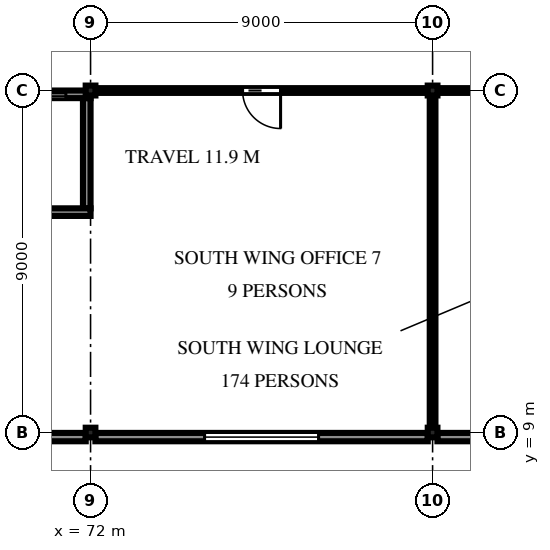
"""IFC4 building model, lengths in metres.
Left out: names, types, materials, properties, quantities, classifications, styles, units other than length and angle.
Written with IfcOpenShell. Run it as: python <this file> out.ifc"""

import sys

from ifc_helpers import new_model, si_unit, direction, frame, frame_2d, origin, origin_2d, place, context, subcontext, project, spatial, polyline, rectangle, i_section, outline, extrude, element, fill, save


model = new_model("IFC4")
c1 = context("Model", 3, precision=1e-05, world=origin(), true_north=direction((0.0, 1.0)))
c2 = subcontext(c1, "Body", "Model", "MODEL_VIEW")
j1 = project(units=[si_unit("LENGTHUNIT", "METRE"), si_unit("PLANEANGLEUNIT", "RADIAN")], contexts=[c1])
p1 = place(None, origin())
s1 = spatial("IfcSite", under=j1, at=p1, CompositionType="ELEMENT")
p2 = place(p1, origin())
s2 = spatial("IfcBuilding", under=s1, at=p2, CompositionType="ELEMENT")
p3 = place(p2, frame((0.0, 0.0, 7.5)))
s3 = spatial("IfcBuildingStorey", under=s2, at=p3, CompositionType="ELEMENT", Elevation=7.5)
p4 = place(p3, frame((72.0, 9.0, 0.0), z_axis=(0.0, 0.0, 1.0), x_axis=(1.0, 0.0, 0.0)))
e1 = element("IfcColumn", 1, at=p4, inside=s3, PredefinedType="COLUMN", context=c2, shape_type="SweptSolid", body=[
    extrude(i_section(OverallWidth=0.255, OverallDepth=0.254, WebThickness=0.009, FlangeThickness=0.014, FilletRadius=0.013, at=origin_2d()), origin(), (0.0, 0.0, 1.0), 4.2),
])
p5 = place(p3, frame((72.0, 18.0, 0.0), z_axis=(0.0, 0.0, 1.0), x_axis=(1.0, 0.0, 0.0)))
e2 = element("IfcColumn", 2, at=p5, inside=s3, PredefinedType="COLUMN", context=c2, shape_type="SweptSolid", body=[
    extrude(i_section(OverallWidth=0.256, OverallDepth=0.26, WebThickness=0.01, FlangeThickness=0.017, FilletRadius=0.013, at=origin_2d()), origin(), (0.0, 0.0, 1.0), 4.2),
])
p6 = place(p3, frame((81.0, 9.0, 0.0), z_axis=(0.0, 0.0, 1.0), x_axis=(1.0, 0.0, 0.0)))
e3 = element("IfcColumn", 3, at=p6, inside=s3, PredefinedType="COLUMN", context=c2, shape_type="SweptSolid", body=[
    extrude(i_section(OverallWidth=0.255, OverallDepth=0.254, WebThickness=0.009, FlangeThickness=0.014, FilletRadius=0.013, at=origin_2d()), origin(), (0.0, 0.0, 1.0), 4.2),
])
p7 = place(p3, frame((81.0, 18.0, 0.0), z_axis=(0.0, 0.0, 1.0), x_axis=(1.0, 0.0, 0.0)))
e4 = element("IfcColumn", 4, at=p7, inside=s3, PredefinedType="COLUMN", context=c2, shape_type="SweptSolid", body=[
    extrude(i_section(OverallWidth=0.256, OverallDepth=0.26, WebThickness=0.01, FlangeThickness=0.017, FilletRadius=0.013, at=origin_2d()), origin(), (0.0, 0.0, 1.0), 4.2),
])
p8 = place(p3, frame((63.127, 8.88, -0.13), z_axis=(0.0, 0.0, 1.0), x_axis=(1.0, 0.0, 0.0)))
e5 = element("IfcWall", 5, at=p8, inside=s3, PredefinedType="SOLIDWALL", context=c2, shape_type="SweptSolid", body=[
    extrude(rectangle(XDim=8.746, YDim=0.22, at=frame_2d((4.373, 0.0))), origin(), (0.0, 0.0, 1.0), 3.727),
])
p9 = place(p8, frame((2.873, 0.0, 1.03)))
e6 = element("IfcOpeningElement", 6, at=p9, cuts=e5, PredefinedType="OPENING", context=c2, shape_type="SweptSolid", body=[
    extrude(rectangle(XDim=3.0, YDim=2.1, at=frame_2d((1.5, 1.05))), frame((0.0, 0.12, 0.0), z_axis=(0.0, -1.0, 0.0), x_axis=(1.0, 0.0, 0.0)), (0.0, 0.0, 1.0), 0.24),
])
p10 = place(p3, frame((72.127, 8.88, -0.13), z_axis=(0.0, 0.0, 1.0), x_axis=(1.0, 0.0, 0.0)))
e7 = element("IfcWall", 7, at=p10, inside=s3, PredefinedType="SOLIDWALL", context=c2, shape_type="SweptSolid", body=[
    extrude(rectangle(XDim=8.746, YDim=0.22, at=frame_2d((4.373, 0.0))), origin(), (0.0, 0.0, 1.0), 3.727),
])
p11 = place(p10, frame((2.873, 0.0, 1.03)))
e8 = element("IfcOpeningElement", 8, at=p11, cuts=e7, PredefinedType="OPENING", context=c2, shape_type="SweptSolid", body=[
    extrude(rectangle(XDim=3.0, YDim=2.1, at=frame_2d((1.5, 1.05))), frame((0.0, 0.12, 0.0), z_axis=(0.0, -1.0, 0.0), x_axis=(1.0, 0.0, 0.0)), (0.0, 0.0, 1.0), 0.24),
])
p12 = place(p3, frame((81.127, 8.88, -0.13), z_axis=(0.0, 0.0, 1.0), x_axis=(1.0, 0.0, 0.0)))
e9 = element("IfcWall", 9, at=p12, inside=s3, PredefinedType="SOLIDWALL", context=c2, shape_type="SweptSolid", body=[
    extrude(rectangle(XDim=8.746, YDim=0.22, at=frame_2d((4.373, 0.0))), origin(), (0.0, 0.0, 1.0), 3.727),
])
p13 = place(p12, frame((2.873, 0.0, 1.03)))
e10 = element("IfcOpeningElement", 10, at=p13, cuts=e9, PredefinedType="OPENING", context=c2, shape_type="SweptSolid", body=[
    extrude(rectangle(XDim=3.0, YDim=2.1, at=frame_2d((1.5, 1.05))), frame((0.0, 0.12, 0.0), z_axis=(0.0, -1.0, 0.0), x_axis=(1.0, 0.0, 0.0)), (0.0, 0.0, 1.0), 0.24),
])
p14 = place(p3, frame((69.602, 14.8, 0.0), z_axis=(0.0, 0.0, 1.0), x_axis=(1.0, 0.0, 0.0)))
e11 = element("IfcWall", 11, at=p14, inside=s3, PredefinedType="SOLIDWALL", context=c2, shape_type="SweptSolid", body=[
    extrude(rectangle(XDim=2.398, YDim=0.2, at=frame_2d((1.199, 0.0))), origin(), (0.0, 0.0, 1.0), 3.516),
])
p15 = place(p3, frame((69.602, 17.9, 0.0), z_axis=(0.0, 0.0, 1.0), x_axis=(1.0, 0.0, 0.0)))
e12 = element("IfcWall", 12, at=p15, inside=s3, PredefinedType="SOLIDWALL", context=c2, shape_type="SweptSolid", body=[
    extrude(rectangle(XDim=2.398, YDim=0.2, at=frame_2d((1.199, 0.0))), origin(), (0.0, 0.0, 1.0), 3.516),
])
p16 = place(p15, frame((0.648, 0.0, 0.0)))
e13 = element("IfcOpeningElement", 13, at=p16, cuts=e12, PredefinedType="OPENING", context=c2, shape_type="SweptSolid", body=[
    extrude(rectangle(XDim=1.1, YDim=2.1, at=frame_2d((0.55, 1.05))), frame((0.0, 0.11, 0.0), z_axis=(0.0, -1.0, 0.0), x_axis=(1.0, 0.0, 0.0)), (0.0, 0.0, 1.0), 0.22),
])
p17 = place(p3, frame((71.9, 14.9, 0.0), z_axis=(0.0, 0.0, 1.0), x_axis=(0.0, 1.0, 0.0)))
e14 = element("IfcWall", 14, at=p17, inside=s3, PredefinedType="SOLIDWALL", context=c2, shape_type="SweptSolid", body=[
    extrude(rectangle(XDim=2.9, YDim=0.2, at=frame_2d((1.45, 0.0))), origin(), (0.0, 0.0, 1.0), 3.516),
])
p18 = place(p3, frame((89.872, 18.0, 0.0), z_axis=(0.0, 0.0, 1.0), x_axis=(-1.0, 0.0, 0.0)))
e15 = element("IfcWall", 15, at=p18, inside=s3, PredefinedType="PARTITIONING", context=c2, shape_type="SweptSolid", body=[
    extrude(rectangle(XDim=8.744, YDim=0.125, at=frame_2d((4.372, 0.0))), origin(), (0.0, 0.0, 1.0), 3.307),
])
p19 = place(p18, frame((3.472, 0.0, 0.0)))
e16 = element("IfcOpeningElement", 16, at=p19, cuts=e15, PredefinedType="OPENING", context=c2, shape_type="SweptSolid", body=[
    extrude(rectangle(XDim=1.8, YDim=2.4, at=frame_2d((0.9, 1.2))), frame((0.0, 0.073, 0.0), z_axis=(0.0, -1.0, 0.0), x_axis=(1.0, 0.0, 0.0)), (0.0, 0.0, 1.0), 0.145),
])
p20 = place(p3, frame((80.872, 18.0, 0.0), z_axis=(0.0, 0.0, 1.0), x_axis=(-1.0, 0.0, 0.0)))
e17 = element("IfcWall", 17, at=p20, inside=s3, PredefinedType="PARTITIONING", context=c2, shape_type="SweptSolid", body=[
    extrude(rectangle(XDim=8.744, YDim=0.125, at=frame_2d((4.372, 0.0))), origin(), (0.0, 0.0, 1.0), 3.307),
])
p21 = place(p20, frame((3.872, 0.0, 0.0)))
e18 = element("IfcOpeningElement", 18, at=p21, cuts=e17, PredefinedType="OPENING", context=c2, shape_type="SweptSolid", body=[
    extrude(rectangle(XDim=1.0, YDim=2.1, at=frame_2d((0.5, 1.05))), frame((0.0, 0.073, 0.0), z_axis=(0.0, -1.0, 0.0), x_axis=(1.0, 0.0, 0.0)), (0.0, 0.0, 1.0), 0.145),
])
p22 = place(p3, frame((81.0, 9.127, 0.0), z_axis=(0.0, 0.0, 1.0), x_axis=(0.0, 1.0, 0.0)))
e19 = element("IfcWall", 19, at=p22, inside=s3, PredefinedType="PARTITIONING", context=c2, shape_type="SweptSolid", body=[
    extrude(rectangle(XDim=8.743, YDim=0.15, at=frame_2d((4.372, 0.0))), origin(), (0.0, 0.0, 1.0), 3.307),
])
p23 = place(p11, origin())
e20 = element("IfcWindow", 20, at=p23, inside=s3, PartitioningType="TRIPLE_PANEL_VERTICAL", PredefinedType="WINDOW", context=c2, shape_type="SweptSolid", body=[
    extrude(outline(polyline([(0.0, 0.0), (3.0, 0.0), (3.0, 2.1), (0.0, 2.1), (0.0, 0.0)]), holes=[polyline([(0.07, 0.07), (2.93, 0.07), (2.93, 2.03), (0.07, 2.03), (0.07, 0.07)])]), frame((0.0, 0.03, 0.0), z_axis=(0.0, -1.0, 0.0), x_axis=(1.0, 0.0, 0.0)), (0.0, 0.0, 1.0), 0.06),
    extrude(rectangle(XDim=0.04, YDim=1.96, at=frame_2d((1.017, 1.05))), frame((0.0, 0.022, 0.0), z_axis=(0.0, -1.0, 0.0), x_axis=(1.0, 0.0, 0.0)), (0.0, 0.0, 1.0), 0.044),
    extrude(rectangle(XDim=0.04, YDim=1.96, at=frame_2d((1.983, 1.05))), frame((0.0, 0.022, 0.0), z_axis=(0.0, -1.0, 0.0), x_axis=(1.0, 0.0, 0.0)), (0.0, 0.0, 1.0), 0.044),
    extrude(outline(polyline([(0.07, 0.07), (0.997, 0.07), (0.997, 2.03), (0.07, 2.03), (0.07, 0.07)]), holes=[polyline([(0.1, 0.1), (0.967, 0.1), (0.967, 2.0), (0.1, 2.0), (0.1, 0.1)])]), frame((0.0, 0.022, 0.0), z_axis=(0.0, -1.0, 0.0), x_axis=(1.0, 0.0, 0.0)), (0.0, 0.0, 1.0), 0.045),
    extrude(rectangle(XDim=0.866, YDim=1.9, at=frame_2d((0.533, 1.05))), frame((0.0, 0.006, 0.0), z_axis=(0.0, -1.0, 0.0), x_axis=(1.0, 0.0, 0.0)), (0.0, 0.0, 1.0), 0.012),
    extrude(outline(polyline([(1.037, 0.07), (1.963, 0.07), (1.963, 2.03), (1.037, 2.03), (1.037, 0.07)]), holes=[polyline([(1.067, 0.1), (1.933, 0.1), (1.933, 2.0), (1.067, 2.0), (1.067, 0.1)])]), frame((0.0, 0.022, 0.0), z_axis=(0.0, -1.0, 0.0), x_axis=(1.0, 0.0, 0.0)), (0.0, 0.0, 1.0), 0.045),
    extrude(rectangle(XDim=0.867, YDim=1.9, at=frame_2d((1.5, 1.05))), frame((0.0, 0.006, 0.0), z_axis=(0.0, -1.0, 0.0), x_axis=(1.0, 0.0, 0.0)), (0.0, 0.0, 1.0), 0.012),
    extrude(outline(polyline([(2.003, 0.07), (2.93, 0.07), (2.93, 2.03), (2.003, 2.03), (2.003, 0.07)]), holes=[polyline([(2.033, 0.1), (2.9, 0.1), (2.9, 2.0), (2.033, 2.0), (2.033, 0.1)])]), frame((0.0, 0.022, 0.0), z_axis=(0.0, -1.0, 0.0), x_axis=(1.0, 0.0, 0.0)), (0.0, 0.0, 1.0), 0.045),
    extrude(rectangle(XDim=0.866, YDim=1.9, at=frame_2d((2.467, 1.05))), frame((0.0, 0.006, 0.0), z_axis=(0.0, -1.0, 0.0), x_axis=(1.0, 0.0, 0.0)), (0.0, 0.0, 1.0), 0.012),
])
fill(e8, e20)
p24 = place(p16, origin())
e21 = element("IfcDoor", 21, at=p24, inside=s3, OperationType="SLIDING_TO_LEFT", PredefinedType="DOOR", context=c2, shape_type="SweptSolid", body=[
    extrude(outline(polyline([(0.0, 0.0), (0.07, 0.0), (0.07, 2.03), (1.03, 2.03), (1.03, 0.0), (1.1, 0.0), (1.1, 2.1), (0.0, 2.1), (0.0, 0.0)])), frame((0.0, 0.025, 0.0), z_axis=(0.0, -1.0, 0.0), x_axis=(1.0, 0.0, 0.0)), (0.0, 0.0, 1.0), 0.05),
    extrude(rectangle(XDim=0.524, YDim=2.016, at=frame_2d((0.336, 1.018))), frame((0.0, 0.018, 0.0), z_axis=(0.0, -1.0, 0.0), x_axis=(1.0, 0.0, 0.0)), (0.0, 0.0, 1.0), 0.016),
    extrude(rectangle(XDim=0.52, YDim=2.016, at=frame_2d((0.766, 1.018))), frame((0.0, -0.002, 0.0), z_axis=(0.0, -1.0, 0.0), x_axis=(1.0, 0.0, 0.0)), (0.0, 0.0, 1.0), 0.016),
])
fill(e13, e21)
p25 = place(p21, origin())
e22 = element("IfcDoor", 22, at=p25, inside=s3, OperationType="SINGLE_SWING_LEFT", PredefinedType="DOOR", context=c2, shape_type="SweptSolid", body=[
    extrude(outline(polyline([(0.0, 0.0), (0.07, 0.0), (0.07, 2.03), (0.93, 2.03), (0.93, 0.0), (1.0, 0.0), (1.0, 2.1), (0.0, 2.1), (0.0, 0.0)])), frame((0.0, 0.025, 0.0), z_axis=(0.0, -1.0, 0.0), x_axis=(1.0, 0.0, 0.0)), (0.0, 0.0, 1.0), 0.05),
    extrude(outline(polyline([(0.074, 0.01), (0.926, 0.01), (0.926, 2.026), (0.074, 2.026), (0.074, 0.01)]), holes=[polyline([(0.194, 0.16), (0.806, 0.16), (0.806, 1.01), (0.194, 1.01), (0.194, 0.16)]), polyline([(0.35, 1.16), (0.65, 1.16), (0.65, 1.76), (0.35, 1.76), (0.35, 1.16)])]), frame((0.0, 0.017, 0.0), z_axis=(0.0, -1.0, 0.0), x_axis=(1.0, 0.0, 0.0)), (0.0, 0.0, 1.0), 0.035),
    extrude(rectangle(XDim=0.612, YDim=0.85, at=frame_2d((0.5, 0.585))), frame((0.0, 0.009, 0.0), z_axis=(0.0, -1.0, 0.0), x_axis=(1.0, 0.0, 0.0)), (0.0, 0.0, 1.0), 0.017),
    extrude(rectangle(XDim=0.3, YDim=0.6, at=frame_2d((0.5, 1.46))), frame((0.0, 0.006, 0.0), z_axis=(0.0, -1.0, 0.0), x_axis=(1.0, 0.0, 0.0)), (0.0, 0.0, 1.0), 0.012),
])
fill(e18, e22)
save(model, sys.argv[1])
